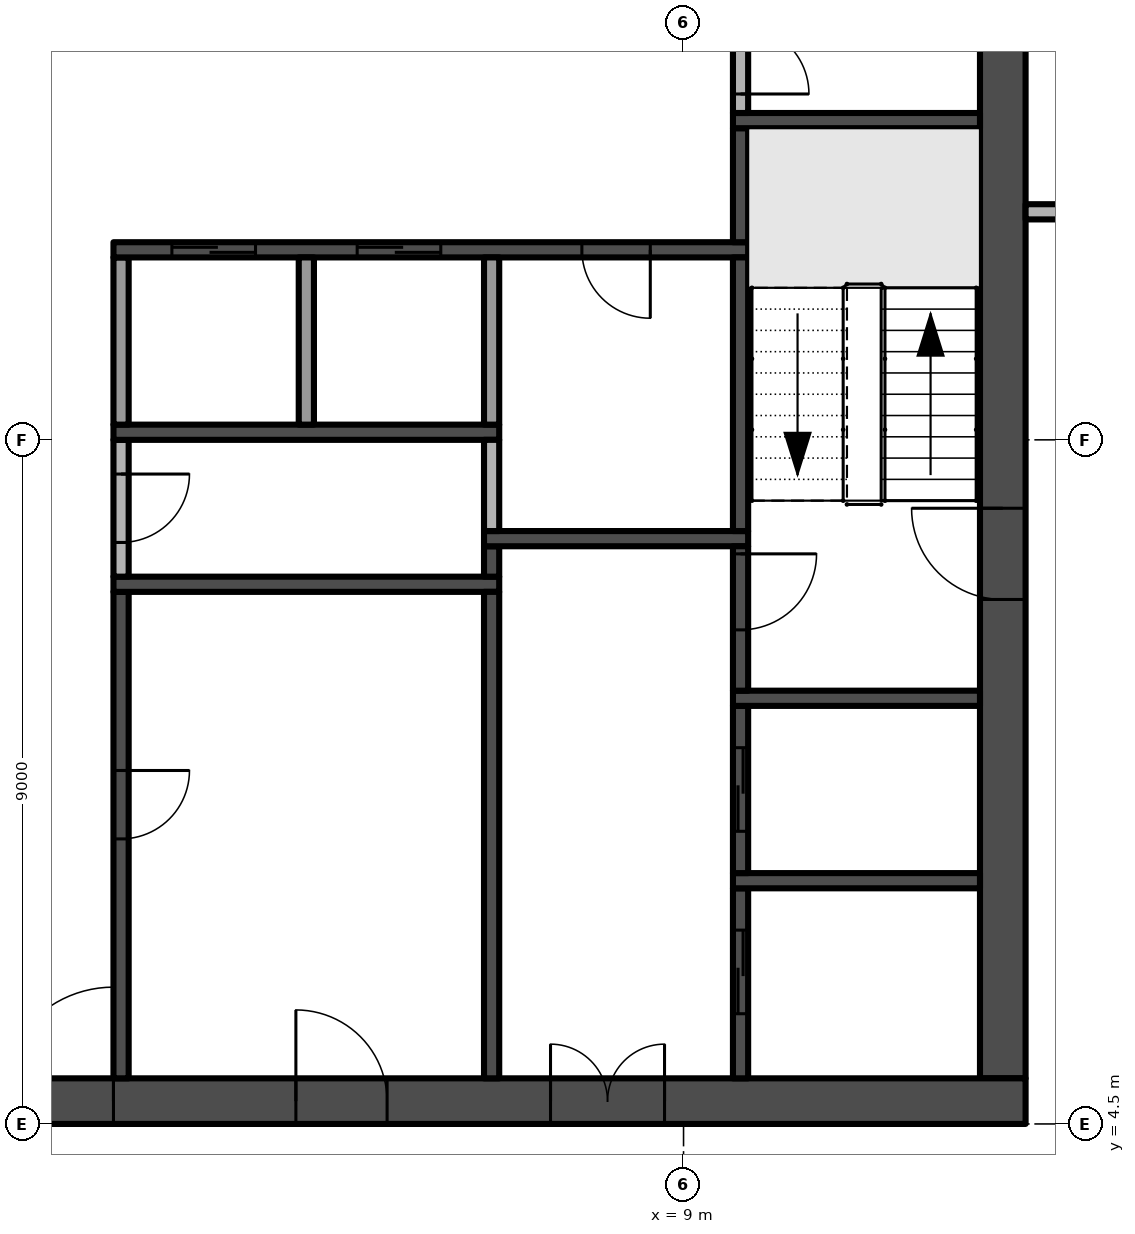
"""IFC4 building model, lengths in metres.
Left out: names, types, materials, properties, quantities, classifications, styles, units other than length and angle.
Written with IfcOpenShell. Run it as: python <this file> out.ifc"""

import sys

from ifc_helpers import new_model, si_unit, direction, frame, frame_2d, origin, place, context, subcontext, project, spatial, rectangle, extrude, element, fill, save


model = new_model("IFC4")
c1 = context("Model", 3, precision=1e-05, world=origin(), true_north=direction((0.0, 1.0)))
c2 = subcontext(c1, "Body", "Model", "MODEL_VIEW")
j1 = project(units=[si_unit("LENGTHUNIT", "METRE"), si_unit("PLANEANGLEUNIT", "RADIAN")], contexts=[c1])
p1 = place(None, origin())
s1 = spatial("IfcSite", under=j1, at=p1, CompositionType="ELEMENT")
p2 = place(p1, origin())
s2 = spatial("IfcBuilding", under=s1, at=p2, CompositionType="ELEMENT")
p3 = place(p2, frame((0.0, 0.0, 261.6)))
s3 = spatial("IfcBuildingStorey", under=s2, at=p3, CompositionType="ELEMENT", Elevation=261.6)
p4 = place(p3, frame((-13.5, 4.8, -0.3), z_axis=(0.0, 0.0, 1.0), x_axis=(1.0, 0.0, 0.0)))
e1 = element("IfcWall", 1, at=p4, inside=s3, PredefinedType="SHEAR", context=c2, shape_type="SweptSolid", body=[
    extrude(rectangle(XDim=27.0, YDim=0.6, at=frame_2d((13.5, 0.0))), origin(), (0.0, 0.0, 1.0), 3.8),
])
p5 = place(p4, frame((12.0, 0.0, 0.3)))
e2 = element("IfcOpeningElement", 2, at=p5, cuts=e1, PredefinedType="OPENING", context=c2, shape_type="SweptSolid", body=[
    extrude(rectangle(XDim=3.0, YDim=2.4, at=frame_2d((1.5, 1.2))), frame((0.0, 0.31, 0.0), z_axis=(0.0, -1.0, 0.0), x_axis=(1.0, 0.0, 0.0)), (0.0, 0.0, 1.0), 0.62),
])
p6 = place(p4, frame((4.9, 0.0, 0.3)))
e3 = element("IfcOpeningElement", 3, at=p6, cuts=e1, PredefinedType="OPENING", context=c2, shape_type="SweptSolid", body=[
    extrude(rectangle(XDim=1.2, YDim=2.2, at=frame_2d((0.6, 1.1))), frame((0.0, 0.31, 0.0), z_axis=(0.0, -1.0, 0.0), x_axis=(1.0, 0.0, 0.0)), (0.0, 0.0, 1.0), 0.62),
])
p7 = place(p4, frame((20.75, 0.0, 0.3)))
e4 = element("IfcOpeningElement", 4, at=p7, cuts=e1, PredefinedType="OPENING", context=c2, shape_type="SweptSolid", body=[
    extrude(rectangle(XDim=1.5, YDim=2.2, at=frame_2d((0.75, 1.1))), frame((0.0, 0.31, 0.0), z_axis=(0.0, -1.0, 0.0), x_axis=(1.0, 0.0, 0.0)), (0.0, 0.0, 1.0), 0.62),
])
p8 = place(p4, frame((17.4, 0.0, 0.3)))
e5 = element("IfcOpeningElement", 5, at=p8, cuts=e1, PredefinedType="OPENING", context=c2, shape_type="SweptSolid", body=[
    extrude(rectangle(XDim=1.2, YDim=2.2, at=frame_2d((0.6, 1.1))), frame((0.0, 0.31, 0.0), z_axis=(0.0, -1.0, 0.0), x_axis=(1.0, 0.0, 0.0)), (0.0, 0.0, 1.0), 0.62),
])
p9 = place(p3, frame((13.2, 5.1, -0.3), z_axis=(0.0, 0.0, 1.0), x_axis=(0.0, 1.0, 0.0)))
e6 = element("IfcWall", 6, at=p9, inside=s3, PredefinedType="SHEAR", context=c2, shape_type="SweptSolid", body=[
    extrude(rectangle(XDim=16.8, YDim=0.6, at=frame_2d((8.4, 0.0))), origin(), (0.0, 0.0, 1.0), 3.8),
])
p10 = place(p9, frame((6.3, 0.0, 0.3)))
e7 = element("IfcOpeningElement", 7, at=p10, cuts=e6, PredefinedType="OPENING", context=c2, shape_type="SweptSolid", body=[
    extrude(rectangle(XDim=1.2, YDim=2.2, at=frame_2d((0.6, 1.1))), frame((0.0, 0.31, 0.0), z_axis=(0.0, -1.0, 0.0), x_axis=(1.0, 0.0, 0.0)), (0.0, 0.0, 1.0), 0.62),
])
p11 = place(p3, frame((1.6, 11.5, 0.0), z_axis=(0.0, 0.0, 1.0), x_axis=(0.0, -1.0, 0.0)))
e8 = element("IfcWall", 8, at=p11, inside=s3, PredefinedType="SHEAR", context=c2, shape_type="SweptSolid", body=[
    extrude(rectangle(XDim=6.4, YDim=0.2, at=frame_2d((3.2, 0.0))), origin(), (0.0, 0.0, 1.0), 3.5),
])
p12 = place(p11, frame((2.35, 0.0, 0.0)))
e9 = element("IfcOpeningElement", 9, at=p12, cuts=e8, PredefinedType="OPENING", context=c2, shape_type="SweptSolid", body=[
    extrude(rectangle(XDim=0.9, YDim=2.1, at=frame_2d((0.45, 1.05))), frame((0.0, 0.11, 0.0), z_axis=(0.0, -1.0, 0.0), x_axis=(1.0, 0.0, 0.0)), (0.0, 0.0, 1.0), 0.22),
])
p13 = place(p3, frame((1.5, 11.6, 0.0), z_axis=(0.0, 0.0, 1.0), x_axis=(1.0, 0.0, 0.0)))
e10 = element("IfcWall", 10, at=p13, inside=s3, PredefinedType="SHEAR", context=c2, shape_type="SweptSolid", body=[
    extrude(rectangle(XDim=5.075, YDim=0.2, at=frame_2d((2.538, 0.0))), origin(), (0.0, 0.0, 1.0), 3.5),
])
p14 = place(p3, frame((1.6, 13.5, 0.0), z_axis=(0.0, 0.0, 1.0), x_axis=(0.0, -1.0, 0.0)))
e11 = element("IfcWall", 11, at=p14, inside=s3, PredefinedType="PARTITIONING", context=c2, shape_type="SweptSolid", body=[
    extrude(rectangle(XDim=1.8, YDim=0.2, at=frame_2d((0.9, 0.0))), origin(), (0.0, 0.0, 1.0), 3.5),
])
p15 = place(p14, frame((0.45, 0.0, 0.0)))
e12 = element("IfcOpeningElement", 12, at=p15, cuts=e11, PredefinedType="OPENING", context=c2, shape_type="SweptSolid", body=[
    extrude(rectangle(XDim=0.9, YDim=2.1, at=frame_2d((0.45, 1.05))), frame((0.0, 0.11, 0.0), z_axis=(0.0, -1.0, 0.0), x_axis=(1.0, 0.0, 0.0)), (0.0, 0.0, 1.0), 0.22),
])
p16 = place(p3, frame((1.5, 13.6, 0.0), z_axis=(0.0, 0.0, 1.0), x_axis=(1.0, 0.0, 0.0)))
e13 = element("IfcWall", 13, at=p16, inside=s3, PredefinedType="SHEAR", context=c2, shape_type="SweptSolid", body=[
    extrude(rectangle(XDim=5.075, YDim=0.2, at=frame_2d((2.538, 0.0))), origin(), (0.0, 0.0, 1.0), 3.5),
])
p17 = place(p3, frame((1.6, 13.7, 0.0), z_axis=(0.0, 0.0, 1.0), x_axis=(0.0, 1.0, 0.0)))
e14 = element("IfcWall", 14, at=p17, inside=s3, PredefinedType="PARTITIONING", context=c2, shape_type="SweptSolid", body=[
    extrude(rectangle(XDim=2.2, YDim=0.2, at=frame_2d((1.1, 0.0))), origin(), (0.0, 0.0, 1.0), 3.5),
])
p18 = place(p3, frame((9.85, 16.0, 0.0), z_axis=(0.0, 0.0, 1.0), x_axis=(-1.0, 0.0, 0.0)))
e15 = element("IfcWall", 15, at=p18, inside=s3, PredefinedType="SHEAR", context=c2, shape_type="SweptSolid", body=[
    extrude(rectangle(XDim=8.35, YDim=0.2, at=frame_2d((4.175, 0.0))), origin(), (0.0, 0.0, 1.0), 3.5),
])
p19 = place(p18, frame((6.481, 0.0, 0.0)))
e16 = element("IfcOpeningElement", 16, at=p19, cuts=e15, PredefinedType="OPENING", context=c2, shape_type="SweptSolid", body=[
    extrude(rectangle(XDim=1.1, YDim=2.1, at=frame_2d((0.55, 1.05))), frame((0.0, 0.11, 0.0), z_axis=(0.0, -1.0, 0.0), x_axis=(1.0, 0.0, 0.0)), (0.0, 0.0, 1.0), 0.22),
])
p20 = place(p18, frame((4.044, 0.0, 0.0)))
e17 = element("IfcOpeningElement", 17, at=p20, cuts=e15, PredefinedType="OPENING", context=c2, shape_type="SweptSolid", body=[
    extrude(rectangle(XDim=1.1, YDim=2.1, at=frame_2d((0.55, 1.05))), frame((0.0, 0.11, 0.0), z_axis=(0.0, -1.0, 0.0), x_axis=(1.0, 0.0, 0.0)), (0.0, 0.0, 1.0), 0.22),
])
p21 = place(p18, frame((1.288, 0.0, 0.0)))
e18 = element("IfcOpeningElement", 18, at=p21, cuts=e15, PredefinedType="OPENING", context=c2, shape_type="SweptSolid", body=[
    extrude(rectangle(XDim=0.9, YDim=2.1, at=frame_2d((0.45, 1.05))), frame((0.0, 0.11, 0.0), z_axis=(0.0, -1.0, 0.0), x_axis=(1.0, 0.0, 0.0)), (0.0, 0.0, 1.0), 0.22),
])
p22 = place(p3, frame((4.037, 13.7, 0.0), z_axis=(0.0, 0.0, 1.0), x_axis=(0.0, 1.0, 0.0)))
e19 = element("IfcWall", 19, at=p22, inside=s3, PredefinedType="PARTITIONING", context=c2, shape_type="SweptSolid", body=[
    extrude(rectangle(XDim=2.2, YDim=0.2, at=frame_2d((1.1, 0.0))), origin(), (0.0, 0.0, 1.0), 3.5),
])
p23 = place(p3, frame((6.475, 5.1, 0.0), z_axis=(0.0, 0.0, 1.0), x_axis=(0.0, 1.0, 0.0)))
e20 = element("IfcWall", 20, at=p23, inside=s3, PredefinedType="SHEAR", context=c2, shape_type="SweptSolid", body=[
    extrude(rectangle(XDim=6.4, YDim=0.2, at=frame_2d((3.2, 0.0))), origin(), (0.0, 0.0, 1.0), 3.5),
])
p24 = place(p3, frame((6.475, 11.7, 0.0), z_axis=(0.0, 0.0, 1.0), x_axis=(0.0, 1.0, 0.0)))
e21 = element("IfcWall", 21, at=p24, inside=s3, PredefinedType="SHEAR", context=c2, shape_type="SweptSolid", body=[
    extrude(rectangle(XDim=0.4, YDim=0.2, at=frame_2d((0.2, 0.0))), origin(), (0.0, 0.0, 1.0), 3.5),
])
p25 = place(p3, frame((6.375, 12.2, 0.0), z_axis=(0.0, 0.0, 1.0), x_axis=(1.0, 0.0, 0.0)))
e22 = element("IfcWall", 22, at=p25, inside=s3, PredefinedType="SHEAR", context=c2, shape_type="SweptSolid", body=[
    extrude(rectangle(XDim=3.475, YDim=0.2, at=frame_2d((1.738, 0.0))), origin(), (0.0, 0.0, 1.0), 3.5),
])
p26 = place(p3, frame((6.475, 12.3, 0.0), z_axis=(0.0, 0.0, 1.0), x_axis=(0.0, 1.0, 0.0)))
e23 = element("IfcWall", 23, at=p26, inside=s3, PredefinedType="PARTITIONING", context=c2, shape_type="SweptSolid", body=[
    extrude(rectangle(XDim=1.2, YDim=0.2, at=frame_2d((0.6, 0.0))), origin(), (0.0, 0.0, 1.0), 3.5),
])
p27 = place(p3, frame((6.475, 13.7, 0.0), z_axis=(0.0, 0.0, 1.0), x_axis=(0.0, 1.0, 0.0)))
e24 = element("IfcWall", 24, at=p27, inside=s3, PredefinedType="PARTITIONING", context=c2, shape_type="SweptSolid", body=[
    extrude(rectangle(XDim=2.2, YDim=0.2, at=frame_2d((1.1, 0.0))), origin(), (0.0, 0.0, 1.0), 3.5),
])
p28 = place(p3, frame((9.75, 5.1, 0.0), z_axis=(0.0, 0.0, 1.0), x_axis=(0.0, 1.0, 0.0)))
e25 = element("IfcWall", 25, at=p28, inside=s3, PredefinedType="SHEAR", context=c2, shape_type="SweptSolid", body=[
    extrude(rectangle(XDim=2.5, YDim=0.2, at=frame_2d((1.25, 0.0))), origin(), (0.0, 0.0, 1.0), 3.5),
])
p29 = place(p28, frame((0.85, 0.0, 0.0)))
e26 = element("IfcOpeningElement", 26, at=p29, cuts=e25, PredefinedType="OPENING", context=c2, shape_type="SweptSolid", body=[
    extrude(rectangle(XDim=1.1, YDim=2.1, at=frame_2d((0.55, 1.05))), frame((0.0, 0.11, 0.0), z_axis=(0.0, -1.0, 0.0), x_axis=(1.0, 0.0, 0.0)), (0.0, 0.0, 1.0), 0.22),
])
p30 = place(p3, frame((9.65, 7.7, 0.0), z_axis=(0.0, 0.0, 1.0), x_axis=(1.0, 0.0, 0.0)))
e27 = element("IfcWall", 27, at=p30, inside=s3, PredefinedType="SHEAR", context=c2, shape_type="SweptSolid", body=[
    extrude(rectangle(XDim=3.25, YDim=0.2, at=frame_2d((1.625, 0.0))), origin(), (0.0, 0.0, 1.0), 3.5),
])
p31 = place(p3, frame((9.75, 7.8, 0.0), z_axis=(0.0, 0.0, 1.0), x_axis=(0.0, 1.0, 0.0)))
e28 = element("IfcWall", 28, at=p31, inside=s3, PredefinedType="SHEAR", context=c2, shape_type="SweptSolid", body=[
    extrude(rectangle(XDim=2.2, YDim=0.2, at=frame_2d((1.1, 0.0))), origin(), (0.0, 0.0, 1.0), 3.5),
])
p32 = place(p31, frame((0.55, 0.0, 0.0)))
e29 = element("IfcOpeningElement", 29, at=p32, cuts=e28, PredefinedType="OPENING", context=c2, shape_type="SweptSolid", body=[
    extrude(rectangle(XDim=1.1, YDim=2.1, at=frame_2d((0.55, 1.05))), frame((0.0, 0.11, 0.0), z_axis=(0.0, -1.0, 0.0), x_axis=(1.0, 0.0, 0.0)), (0.0, 0.0, 1.0), 0.22),
])
p33 = place(p3, frame((9.65, 10.1, 0.0), z_axis=(0.0, 0.0, 1.0), x_axis=(1.0, 0.0, 0.0)))
e30 = element("IfcWall", 30, at=p33, inside=s3, PredefinedType="SHEAR", context=c2, shape_type="SweptSolid", body=[
    extrude(rectangle(XDim=3.25, YDim=0.2, at=frame_2d((1.625, 0.0))), origin(), (0.0, 0.0, 1.0), 3.5),
])
p34 = place(p3, frame((9.75, 12.1, 0.0), z_axis=(0.0, 0.0, 1.0), x_axis=(0.0, -1.0, 0.0)))
e31 = element("IfcWall", 31, at=p34, inside=s3, PredefinedType="SHEAR", context=c2, shape_type="SweptSolid", body=[
    extrude(rectangle(XDim=1.9, YDim=0.2, at=frame_2d((0.95, 0.0))), origin(), (0.0, 0.0, 1.0), 3.5),
])
p35 = place(p34, frame((0.1, 0.0, 0.0)))
e32 = element("IfcOpeningElement", 32, at=p35, cuts=e31, PredefinedType="OPENING", context=c2, shape_type="SweptSolid", body=[
    extrude(rectangle(XDim=1.0, YDim=2.2, at=frame_2d((0.5, 1.1))), frame((0.0, 0.11, 0.0), z_axis=(0.0, -1.0, 0.0), x_axis=(1.0, 0.0, 0.0)), (0.0, 0.0, 1.0), 0.22),
])
p36 = place(p3, frame((9.75, 12.3, 0.0), z_axis=(0.0, 0.0, 1.0), x_axis=(0.0, 1.0, 0.0)))
e33 = element("IfcWall", 33, at=p36, inside=s3, PredefinedType="SHEAR", context=c2, shape_type="SweptSolid", body=[
    extrude(rectangle(XDim=3.6, YDim=0.2, at=frame_2d((1.8, 0.0))), origin(), (0.0, 0.0, 1.0), 3.5),
])
p37 = place(p3, frame((9.75, 16.1, 0.0), z_axis=(0.0, 0.0, 1.0), x_axis=(0.0, 1.0, 0.0)))
e34 = element("IfcWall", 34, at=p37, inside=s3, PredefinedType="SHEAR", context=c2, shape_type="SweptSolid", body=[
    extrude(rectangle(XDim=1.5, YDim=0.2, at=frame_2d((0.75, 0.0))), origin(), (0.0, 0.0, 1.0), 3.5),
])
p38 = place(p3, frame((9.65, 17.7, 0.0), z_axis=(0.0, 0.0, 1.0), x_axis=(1.0, 0.0, 0.0)))
e35 = element("IfcWall", 35, at=p38, inside=s3, PredefinedType="SHEAR", context=c2, shape_type="SweptSolid", body=[
    extrude(rectangle(XDim=3.25, YDim=0.2, at=frame_2d((1.625, 0.0))), origin(), (0.0, 0.0, 1.0), 3.5),
])
p39 = place(p3, frame((9.75, 19.2, 0.0), z_axis=(0.0, 0.0, 1.0), x_axis=(0.0, -1.0, 0.0)))
e36 = element("IfcWall", 36, at=p39, inside=s3, PredefinedType="PARTITIONING", context=c2, shape_type="SweptSolid", body=[
    extrude(rectangle(XDim=1.4, YDim=0.2, at=frame_2d((0.7, 0.0))), origin(), (0.0, 0.0, 1.0), 3.5),
])
p40 = place(p39, frame((0.25, 0.0, 0.0)))
e37 = element("IfcOpeningElement", 37, at=p40, cuts=e36, PredefinedType="OPENING", context=c2, shape_type="SweptSolid", body=[
    extrude(rectangle(XDim=0.9, YDim=2.1, at=frame_2d((0.45, 1.05))), frame((0.0, 0.11, 0.0), z_axis=(0.0, -1.0, 0.0), x_axis=(1.0, 0.0, 0.0)), (0.0, 0.0, 1.0), 0.22),
])
p41 = place(p3, frame((13.5, 16.5, 0.0), z_axis=(0.0, 0.0, 1.0), x_axis=(1.0, 0.0, 0.0)))
e38 = element("IfcWall", 38, at=p41, inside=s3, PredefinedType="PARTITIONING", context=c2, shape_type="SweptSolid", body=[
    extrude(rectangle(XDim=3.825, YDim=0.2, at=frame_2d((1.913, 0.0))), origin(), (0.0, 0.0, 1.0), 3.5),
])
p42 = place(p41, frame((1.55, 0.0, 0.0)))
e39 = element("IfcOpeningElement", 39, at=p42, cuts=e38, PredefinedType="OPENING", context=c2, shape_type="SweptSolid", body=[
    extrude(rectangle(XDim=0.9, YDim=2.1, at=frame_2d((0.45, 1.05))), frame((0.0, 0.11, 0.0), z_axis=(0.0, -1.0, 0.0), x_axis=(1.0, 0.0, 0.0)), (0.0, 0.0, 1.0), 0.22),
])
p43 = place(p5, frame((3.0, 0.0, 0.0), z_axis=(0.0, 0.0, 1.0), x_axis=(-1.0, 0.0, 0.0)))
e40 = element("IfcDoor", 40, at=p43, inside=s3, OperationType="DOUBLE_DOOR_SINGLE_SWING", PredefinedType="DOOR", context=c2, shape_type="SweptSolid", body=[
    extrude(rectangle(XDim=3.0, YDim=2.4, at=frame_2d((1.5, 1.2))), frame((0.0, 0.025, 0.0), z_axis=(0.0, -1.0, 0.0), x_axis=(1.0, 0.0, 0.0)), (0.0, 0.0, 1.0), 0.05),
])
fill(e2, e40)
p44 = place(p10, frame((1.2, 0.0, 0.0), z_axis=(0.0, 0.0, 1.0), x_axis=(-1.0, 0.0, 0.0)))
e41 = element("IfcDoor", 41, at=p44, inside=s3, OperationType="SINGLE_SWING_LEFT", PredefinedType="DOOR", context=c2, shape_type="SweptSolid", body=[
    extrude(rectangle(XDim=1.2, YDim=2.2, at=frame_2d((0.6, 1.1))), frame((0.0, 0.025, 0.0), z_axis=(0.0, -1.0, 0.0), x_axis=(1.0, 0.0, 0.0)), (0.0, 0.0, 1.0), 0.05),
])
fill(e7, e41)
p45 = place(p7, frame((1.5, 0.0, 0.0), z_axis=(0.0, 0.0, 1.0), x_axis=(-1.0, 0.0, 0.0)))
e42 = element("IfcDoor", 42, at=p45, inside=s3, OperationType="DOUBLE_DOOR_SINGLE_SWING", PredefinedType="DOOR", context=c2, shape_type="SweptSolid", body=[
    extrude(rectangle(XDim=1.5, YDim=2.2, at=frame_2d((0.75, 1.1))), frame((0.0, 0.025, 0.0), z_axis=(0.0, -1.0, 0.0), x_axis=(1.0, 0.0, 0.0)), (0.0, 0.0, 1.0), 0.05),
])
fill(e4, e42)
p46 = place(p8, frame((1.2, 0.0, 0.0), z_axis=(0.0, 0.0, 1.0), x_axis=(-1.0, 0.0, 0.0)))
e43 = element("IfcDoor", 43, at=p46, inside=s3, OperationType="SINGLE_SWING_RIGHT", PredefinedType="DOOR", context=c2, shape_type="SweptSolid", body=[
    extrude(rectangle(XDim=1.2, YDim=2.2, at=frame_2d((0.6, 1.1))), frame((0.0, 0.025, 0.0), z_axis=(0.0, -1.0, 0.0), x_axis=(1.0, 0.0, 0.0)), (0.0, 0.0, 1.0), 0.05),
])
fill(e5, e43)
p47 = place(p35, origin())
e44 = element("IfcDoor", 44, at=p47, inside=s3, OperationType="SINGLE_SWING_LEFT", PredefinedType="DOOR", context=c2, shape_type="SweptSolid", body=[
    extrude(rectangle(XDim=1.0, YDim=2.2, at=frame_2d((0.5, 1.1))), frame((0.0, 0.025, 0.0), z_axis=(0.0, -1.0, 0.0), x_axis=(1.0, 0.0, 0.0)), (0.0, 0.0, 1.0), 0.05),
])
fill(e32, e44)
p48 = place(p19, origin())
e45 = element("IfcDoor", 45, at=p48, inside=s3, OperationType="SLIDING_TO_RIGHT", PredefinedType="DOOR", context=c2, shape_type="SweptSolid", body=[
    extrude(rectangle(XDim=1.1, YDim=2.1, at=frame_2d((0.55, 1.05))), frame((0.0, 0.025, 0.0), z_axis=(0.0, -1.0, 0.0), x_axis=(1.0, 0.0, 0.0)), (0.0, 0.0, 1.0), 0.05),
])
fill(e16, e45)
p49 = place(p20, origin())
e46 = element("IfcDoor", 46, at=p49, inside=s3, OperationType="SLIDING_TO_RIGHT", PredefinedType="DOOR", context=c2, shape_type="SweptSolid", body=[
    extrude(rectangle(XDim=1.1, YDim=2.1, at=frame_2d((0.55, 1.05))), frame((0.0, 0.025, 0.0), z_axis=(0.0, -1.0, 0.0), x_axis=(1.0, 0.0, 0.0)), (0.0, 0.0, 1.0), 0.05),
])
fill(e17, e46)
p50 = place(p29, origin())
e47 = element("IfcDoor", 47, at=p50, inside=s3, OperationType="SLIDING_TO_RIGHT", PredefinedType="DOOR", context=c2, shape_type="SweptSolid", body=[
    extrude(rectangle(XDim=1.1, YDim=2.1, at=frame_2d((0.55, 1.05))), frame((0.0, 0.025, 0.0), z_axis=(0.0, -1.0, 0.0), x_axis=(1.0, 0.0, 0.0)), (0.0, 0.0, 1.0), 0.05),
])
fill(e26, e47)
p51 = place(p32, origin())
e48 = element("IfcDoor", 48, at=p51, inside=s3, OperationType="SLIDING_TO_RIGHT", PredefinedType="DOOR", context=c2, shape_type="SweptSolid", body=[
    extrude(rectangle(XDim=1.1, YDim=2.1, at=frame_2d((0.55, 1.05))), frame((0.0, 0.025, 0.0), z_axis=(0.0, -1.0, 0.0), x_axis=(1.0, 0.0, 0.0)), (0.0, 0.0, 1.0), 0.05),
])
fill(e29, e48)
p52 = place(p12, origin())
e49 = element("IfcDoor", 49, at=p52, inside=s3, OperationType="SINGLE_SWING_LEFT", PredefinedType="DOOR", context=c2, shape_type="SweptSolid", body=[
    extrude(rectangle(XDim=0.9, YDim=2.1, at=frame_2d((0.45, 1.05))), frame((0.0, 0.025, 0.0), z_axis=(0.0, -1.0, 0.0), x_axis=(1.0, 0.0, 0.0)), (0.0, 0.0, 1.0), 0.05),
])
fill(e9, e49)
p53 = place(p15, origin())
e50 = element("IfcDoor", 50, at=p53, inside=s3, OperationType="SINGLE_SWING_LEFT", PredefinedType="DOOR", context=c2, shape_type="SweptSolid", body=[
    extrude(rectangle(XDim=0.9, YDim=2.1, at=frame_2d((0.45, 1.05))), frame((0.0, 0.025, 0.0), z_axis=(0.0, -1.0, 0.0), x_axis=(1.0, 0.0, 0.0)), (0.0, 0.0, 1.0), 0.05),
])
fill(e12, e50)
p54 = place(p21, origin())
e51 = element("IfcDoor", 51, at=p54, inside=s3, OperationType="SINGLE_SWING_LEFT", PredefinedType="DOOR", context=c2, shape_type="SweptSolid", body=[
    extrude(rectangle(XDim=0.9, YDim=2.1, at=frame_2d((0.45, 1.05))), frame((0.0, 0.025, 0.0), z_axis=(0.0, -1.0, 0.0), x_axis=(1.0, 0.0, 0.0)), (0.0, 0.0, 1.0), 0.05),
])
fill(e18, e51)
p55 = place(p40, origin())
e52 = element("IfcDoor", 52, at=p55, inside=s3, OperationType="SINGLE_SWING_RIGHT", PredefinedType="DOOR", context=c2, shape_type="SweptSolid", body=[
    extrude(rectangle(XDim=0.9, YDim=2.1, at=frame_2d((0.45, 1.05))), frame((0.0, 0.025, 0.0), z_axis=(0.0, -1.0, 0.0), x_axis=(1.0, 0.0, 0.0)), (0.0, 0.0, 1.0), 0.05),
])
fill(e37, e52)
save(model, sys.argv[1])
